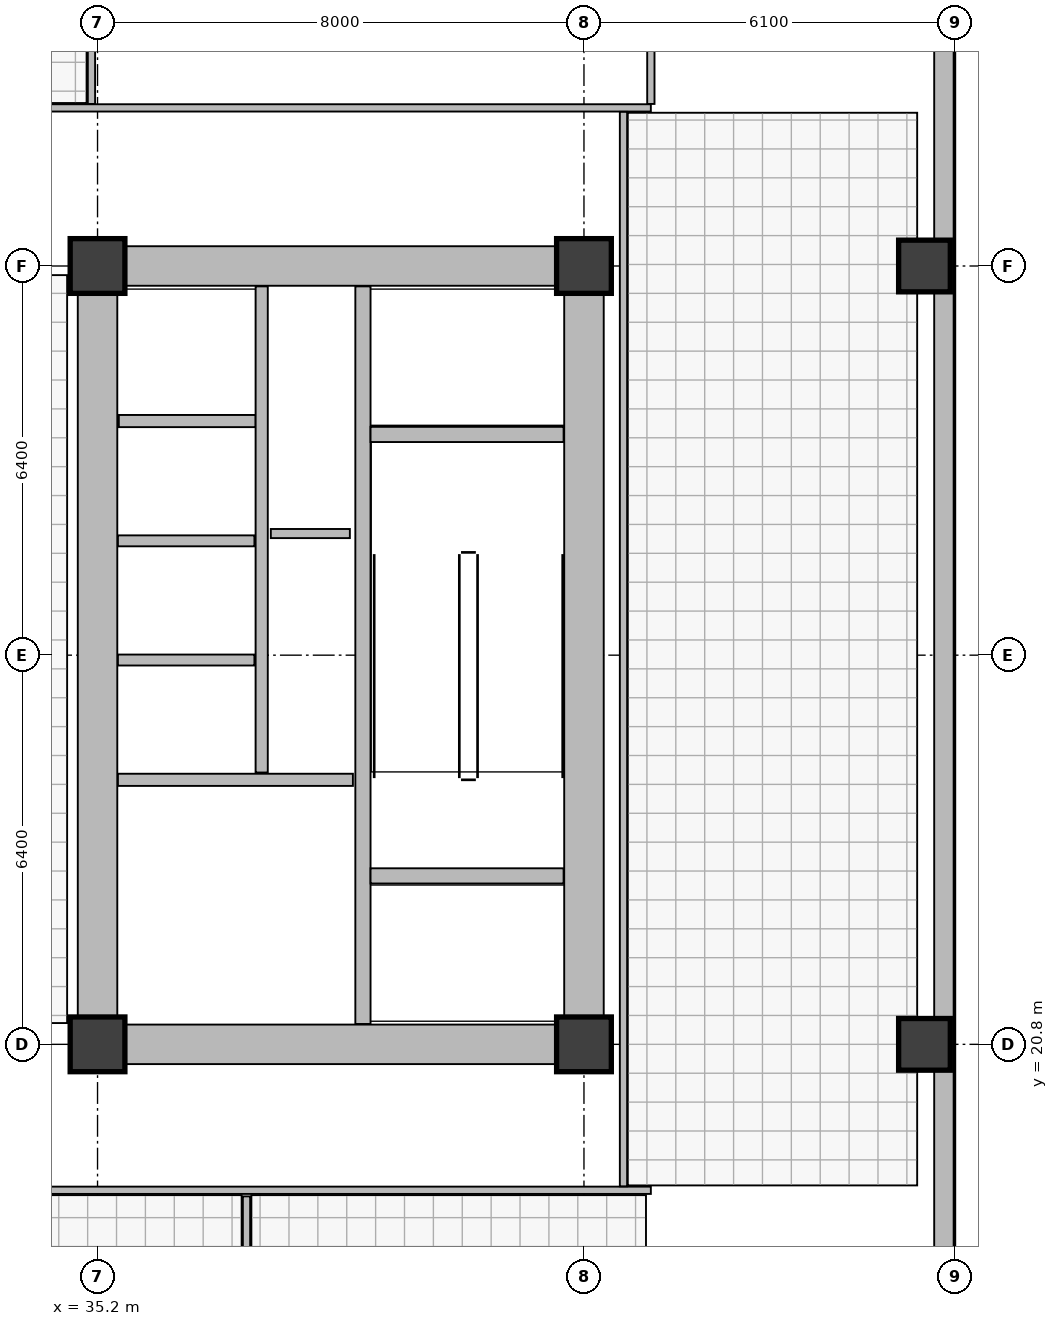
"""IFC4 building model, lengths in metres.
Left out: names, types, materials, properties, quantities, classifications, styles, units other than length and angle.
Written with IfcOpenShell. Run it as: python <this file> out.ifc"""

import sys

from ifc_helpers import new_model, si_unit, direction, frame, frame_2d, origin, origin_2d, place, context, subcontext, project, spatial, rectangle, extrude, element, fill, save


model = new_model("IFC4")
c1 = context("Model", 3, precision=1e-05, world=origin(), true_north=direction((0.0, 1.0)))
c2 = subcontext(c1, "Body", "Model", "MODEL_VIEW")
j1 = project(units=[si_unit("LENGTHUNIT", "METRE"), si_unit("PLANEANGLEUNIT", "RADIAN")], contexts=[c1])
p1 = place(None, origin())
s1 = spatial("IfcSite", under=j1, at=p1, CompositionType="ELEMENT")
p2 = place(p1, origin())
s2 = spatial("IfcBuilding", under=s1, at=p2, CompositionType="ELEMENT")
p3 = place(p2, frame((0.0, 0.0, 202.7)))
s3 = spatial("IfcBuildingStorey", under=s2, at=p3, CompositionType="ELEMENT", Elevation=202.7)
for number, where, z_axis, x_axis in (
    (1, (35.2, 20.8, 0.0), (0.0, 0.0, 1.0), (1.0, 0.0, 0.0)),
    (2, (43.2, 20.8, 0.0), (0.0, 0.0, 1.0), (1.0, 0.0, 0.0)),
    (3, (35.2, 33.6, 0.0), (0.0, 0.0, 1.0), (1.0, 0.0, 0.0)),
    (4, (43.2, 33.6, 0.0), (0.0, 0.0, 1.0), (1.0, 0.0, 0.0)),
):
    element("IfcColumn", number, at=place(p3, frame(where, z_axis=z_axis, x_axis=x_axis)), inside=s3, PredefinedType="COLUMN", context=c2, shape_type="SweptSolid", body=[
        extrude(rectangle(XDim=0.9, YDim=0.9, at=origin_2d()), origin(), (0.0, 0.0, 1.0), 4.8),
    ])
for number, where, z_axis, x_axis in (
    (5, (48.8, 20.8, 0.0), (0.0, 0.0, 1.0), (1.0, 0.0, 0.0)),
    (6, (48.8, 33.6, 0.0), (0.0, 0.0, 1.0), (1.0, 0.0, 0.0)),
):
    element("IfcColumn", number, at=place(p3, frame(where, z_axis=z_axis, x_axis=x_axis)), inside=s3, PredefinedType="COLUMN", context=c2, shape_type="SweptSolid", body=[
        extrude(rectangle(XDim=0.85, YDim=0.85, at=origin_2d()), origin(), (0.0, 0.0, 1.0), 4.8),
    ])
p4 = place(p3, frame((49.12, 47.9, 0.0), z_axis=(0.0, 0.0, 1.0), x_axis=(0.0, -1.0, 0.0)))
e7 = element("IfcWall", 7, at=p4, inside=s3, PredefinedType="STANDARD", context=c2, shape_type="SweptSolid", body=[
    extrude(rectangle(XDim=35.0, YDim=0.32, at=frame_2d((17.5, 0.0))), origin(), (0.0, 0.0, 1.0), 3.735),
])
p5 = place(p3, frame((43.2, 21.255, 0.0), z_axis=(0.0, 0.0, 1.0), x_axis=(0.0, 1.0, 0.0)))
e8 = element("IfcWall", 8, at=p5, inside=s3, PredefinedType="SHEAR", context=c2, shape_type="SweptSolid", body=[
    extrude(rectangle(XDim=11.89, YDim=0.65, at=frame_2d((5.945, 0.0))), origin(), (0.0, 0.0, 1.0), 4.35),
])
p6 = place(p3, frame((35.655, 20.8, 0.0), z_axis=(0.0, 0.0, 1.0), x_axis=(1.0, 0.0, 0.0)))
e9 = element("IfcWall", 9, at=p6, inside=s3, PredefinedType="SHEAR", context=c2, shape_type="SweptSolid", body=[
    extrude(rectangle(XDim=7.09, YDim=0.65, at=frame_2d((3.545, 0.0))), origin(), (0.0, 0.0, 1.0), 4.35),
])
p7 = place(p3, frame((35.655, 33.6, 0.0), z_axis=(0.0, 0.0, 1.0), x_axis=(1.0, 0.0, 0.0)))
e10 = element("IfcWall", 10, at=p7, inside=s3, PredefinedType="SHEAR", context=c2, shape_type="SweptSolid", body=[
    extrude(rectangle(XDim=7.09, YDim=0.65, at=frame_2d((3.545, 0.0))), origin(), (0.0, 0.0, 1.0), 4.35),
])
p8 = place(p7, frame((4.745, 0.0, 0.0)))
e11 = element("IfcOpeningElement", 11, at=p8, cuts=e10, PredefinedType="OPENING", context=c2, shape_type="SweptSolid", body=[
    extrude(rectangle(XDim=1.3, YDim=2.15, at=frame_2d((0.65, 1.075))), frame((0.0, 0.335, 0.0), z_axis=(0.0, -1.0, 0.0), x_axis=(1.0, 0.0, 0.0)), (0.0, 0.0, 1.0), 0.67),
])
p9 = place(p7, frame((2.545, 0.0, 0.0)))
e12 = element("IfcOpeningElement", 12, at=p9, cuts=e10, PredefinedType="OPENING", context=c2, shape_type="SweptSolid", body=[
    extrude(rectangle(XDim=0.85, YDim=2.02, at=frame_2d((0.425, 1.01))), frame((0.0, 0.335, 0.0), z_axis=(0.0, -1.0, 0.0), x_axis=(1.0, 0.0, 0.0)), (0.0, 0.0, 1.0), 0.67),
])
p10 = place(p3, frame((35.2, 21.255, 0.0), z_axis=(0.0, 0.0, 1.0), x_axis=(0.0, 1.0, 0.0)))
e13 = element("IfcWall", 13, at=p10, inside=s3, PredefinedType="SHEAR", context=c2, shape_type="SweptSolid", body=[
    extrude(rectangle(XDim=11.89, YDim=0.65, at=frame_2d((5.945, 0.0))), origin(), (0.0, 0.0, 1.0), 4.35),
])
p11 = place(p10, frame((1.345, 0.0, 0.0)))
e14 = element("IfcOpeningElement", 14, at=p11, cuts=e13, PredefinedType="OPENING", context=c2, shape_type="SweptSolid", body=[
    extrude(rectangle(XDim=1.2, YDim=2.15, at=frame_2d((0.6, 1.075))), frame((0.0, 0.335, 0.0), z_axis=(0.0, -1.0, 0.0), x_axis=(1.0, 0.0, 0.0)), (0.0, 0.0, 1.0), 0.67),
])
p12 = place(p10, frame((4.345, 0.0, 0.0)))
e15 = element("IfcOpeningElement", 15, at=p12, cuts=e13, PredefinedType="OPENING", context=c2, shape_type="SweptSolid", body=[
    extrude(rectangle(XDim=1.1, YDim=2.1, at=frame_2d((0.55, 1.05))), frame((0.0, 0.335, 0.0), z_axis=(0.0, -1.0, 0.0), x_axis=(1.0, 0.0, 0.0)), (0.0, 0.0, 1.0), 0.67),
])
p13 = place(p10, frame((6.295, 0.0, 0.0)))
e16 = element("IfcOpeningElement", 16, at=p13, cuts=e13, PredefinedType="OPENING", context=c2, shape_type="SweptSolid", body=[
    extrude(rectangle(XDim=1.1, YDim=2.1, at=frame_2d((0.55, 1.05))), frame((0.0, 0.335, 0.0), z_axis=(0.0, -1.0, 0.0), x_axis=(1.0, 0.0, 0.0)), (0.0, 0.0, 1.0), 0.67),
])
p14 = place(p10, frame((8.245, 0.0, 0.0)))
e17 = element("IfcOpeningElement", 17, at=p14, cuts=e13, PredefinedType="OPENING", context=c2, shape_type="SweptSolid", body=[
    extrude(rectangle(XDim=1.1, YDim=2.1, at=frame_2d((0.55, 1.05))), frame((0.0, 0.335, 0.0), z_axis=(0.0, -1.0, 0.0), x_axis=(1.0, 0.0, 0.0)), (0.0, 0.0, 1.0), 0.67),
])
p15 = place(p10, frame((10.445, 0.0, 0.0)))
e18 = element("IfcOpeningElement", 18, at=p15, cuts=e13, PredefinedType="OPENING", context=c2, shape_type="SweptSolid", body=[
    extrude(rectangle(XDim=1.1, YDim=2.1, at=frame_2d((0.55, 1.05))), frame((0.0, 0.335, 0.0), z_axis=(0.0, -1.0, 0.0), x_axis=(1.0, 0.0, 0.0)), (0.0, 0.0, 1.0), 0.67),
])
p16 = place(p3, frame((39.565, 21.135, 0.0), z_axis=(0.0, 0.0, 1.0), x_axis=(0.0, 1.0, 0.0)))
e19 = element("IfcWall", 19, at=p16, inside=s3, PredefinedType="SHEAR", context=c2, shape_type="SweptSolid", body=[
    extrude(rectangle(XDim=12.13, YDim=0.25, at=frame_2d((6.065, 0.0))), origin(), (0.0, 0.0, 1.0), 4.35),
])
p17 = place(p16, frame((0.515, 0.0, 0.0)))
e20 = element("IfcOpeningElement", 20, at=p17, cuts=e19, PredefinedType="OPENING", context=c2, shape_type="SweptSolid", body=[
    extrude(rectangle(XDim=1.2, YDim=2.15, at=frame_2d((0.6, 1.075))), frame((0.0, 0.135, 0.0), z_axis=(0.0, -1.0, 0.0), x_axis=(1.0, 0.0, 0.0)), (0.0, 0.0, 1.0), 0.27),
])
p18 = place(p16, frame((2.665, 0.0, 0.0)))
e21 = element("IfcOpeningElement", 21, at=p18, cuts=e19, PredefinedType="OPENING", context=c2, shape_type="SweptSolid", body=[
    extrude(rectangle(XDim=1.15, YDim=2.15, at=frame_2d((0.575, 1.075))), frame((0.0, 0.135, 0.0), z_axis=(0.0, -1.0, 0.0), x_axis=(1.0, 0.0, 0.0)), (0.0, 0.0, 1.0), 0.27),
])
for number, where, z_axis, x_axis in (
    (22, (39.69, 23.57, 0.0), (0.0, 0.0, 1.0), (1.0, 0.0, 0.0)),
    (23, (39.69, 30.83, 0.0), (0.0, 0.0, 1.0), (1.0, 0.0, 0.0)),
):
    element("IfcWall", number, at=place(p3, frame(where, z_axis=z_axis, x_axis=x_axis)), inside=s3, PredefinedType="SHEAR", context=c2, shape_type="SweptSolid", body=[
        extrude(rectangle(XDim=3.175, YDim=0.25, at=frame_2d((1.587, 0.0))), origin(), (0.0, 0.0, 1.0), 4.35),
    ])
p19 = place(p3, frame((35.535, 25.15, 0.0), z_axis=(0.0, 0.0, 1.0), x_axis=(1.0, 0.0, 0.0)))
e24 = element("IfcWall", 24, at=p19, inside=s3, PredefinedType="SOLIDWALL", context=c2, shape_type="SweptSolid", body=[
    extrude(rectangle(XDim=3.865, YDim=0.2, at=frame_2d((1.933, 0.0))), origin(), (0.0, 0.0, 1.0), 4.35),
])
p20 = place(p3, frame((35.55, 31.05, 0.0), z_axis=(0.0, 0.0, 1.0), x_axis=(1.0, 0.0, 0.0)))
e25 = element("IfcWall", 25, at=p20, inside=s3, PredefinedType="SOLIDWALL", context=c2, shape_type="SweptSolid", body=[
    extrude(rectangle(XDim=2.25, YDim=0.2, at=frame_2d((1.125, 0.0))), origin(), (0.0, 0.0, 1.0), 4.35),
])
p21 = place(p3, frame((37.9, 25.27, 0.0), z_axis=(0.0, 0.0, 1.0), x_axis=(0.0, 1.0, 0.0)))
e26 = element("IfcWall", 26, at=p21, inside=s3, PredefinedType="SOLIDWALL", context=c2, shape_type="SweptSolid", body=[
    extrude(rectangle(XDim=7.995, YDim=0.2, at=frame_2d((3.998, 0.0))), origin(), (0.0, 0.0, 1.0), 4.35),
])
for number, where, z_axis, x_axis in (
    (27, (35.535, 27.12, 0.0), (0.0, 0.0, 1.0), (1.0, 0.0, 0.0)),
    (28, (35.535, 29.08, 0.0), (0.0, 0.0, 1.0), (1.0, 0.0, 0.0)),
):
    element("IfcWall", number, at=place(p3, frame(where, z_axis=z_axis, x_axis=x_axis)), inside=s3, PredefinedType="PARTITIONING", context=c2, shape_type="SweptSolid", body=[
        extrude(rectangle(XDim=2.245, YDim=0.18, at=frame_2d((1.123, 0.0))), origin(), (0.0, 0.0, 1.0), 4.35),
    ])
p22 = place(p3, frame((38.05, 29.2, 0.0), z_axis=(0.0, 0.0, 1.0), x_axis=(1.0, 0.0, 0.0)))
e29 = element("IfcWall", 29, at=p22, inside=s3, PredefinedType="PARTITIONING", context=c2, shape_type="SweptSolid", body=[
    extrude(rectangle(XDim=1.3, YDim=0.15, at=frame_2d((0.65, 0.0))), origin(), (0.0, 0.0, 1.0), 4.35),
])
p23 = place(p22, frame((0.22, 0.0, 0.0)))
e30 = element("IfcOpeningElement", 30, at=p23, cuts=e29, PredefinedType="OPENING", context=c2, shape_type="SweptSolid", body=[
    extrude(rectangle(XDim=0.85, YDim=2.02, at=frame_2d((0.425, 1.01))), frame((0.0, 0.085, 0.0), z_axis=(0.0, -1.0, 0.0), x_axis=(1.0, 0.0, 0.0)), (0.0, 0.0, 1.0), 0.17),
])
p24 = place(p3, frame((9.3, 18.4, 0.0), z_axis=(0.0, 0.0, 1.0), x_axis=(1.0, 0.0, 0.0)))
e31 = element("IfcWall", 31, at=p24, inside=s3, PredefinedType="PARTITIONING", context=c2, shape_type="SweptSolid", body=[
    extrude(rectangle(XDim=35.0, YDim=0.12, at=frame_2d((17.5, 0.0))), origin(), (0.0, 0.0, 1.0), 4.35),
])
p25 = place(p24, frame((2.2, 0.0, 0.0)))
e32 = element("IfcOpeningElement", 32, at=p25, cuts=e31, PredefinedType="OPENING", context=c2, shape_type="SweptSolid", body=[
    extrude(rectangle(XDim=1.0, YDim=2.1, at=frame_2d((0.5, 1.05))), frame((0.0, 0.07, 0.0), z_axis=(0.0, -1.0, 0.0), x_axis=(1.0, 0.0, 0.0)), (0.0, 0.0, 1.0), 0.14),
])
p26 = place(p24, frame((9.2, 0.0, 0.0)))
e33 = element("IfcOpeningElement", 33, at=p26, cuts=e31, PredefinedType="OPENING", context=c2, shape_type="SweptSolid", body=[
    extrude(rectangle(XDim=1.0, YDim=2.1, at=frame_2d((0.5, 1.05))), frame((0.0, 0.07, 0.0), z_axis=(0.0, -1.0, 0.0), x_axis=(1.0, 0.0, 0.0)), (0.0, 0.0, 1.0), 0.14),
])
p27 = place(p24, frame((16.55, 0.0, 0.0)))
e34 = element("IfcOpeningElement", 34, at=p27, cuts=e31, PredefinedType="OPENING", context=c2, shape_type="SweptSolid", body=[
    extrude(rectangle(XDim=1.0, YDim=2.1, at=frame_2d((0.5, 1.05))), frame((0.0, 0.07, 0.0), z_axis=(0.0, -1.0, 0.0), x_axis=(1.0, 0.0, 0.0)), (0.0, 0.0, 1.0), 0.14),
])
p28 = place(p24, frame((23.9, 0.0, 0.0)))
e35 = element("IfcOpeningElement", 35, at=p28, cuts=e31, PredefinedType="OPENING", context=c2, shape_type="SweptSolid", body=[
    extrude(rectangle(XDim=1.0, YDim=2.1, at=frame_2d((0.5, 1.05))), frame((0.0, 0.07, 0.0), z_axis=(0.0, -1.0, 0.0), x_axis=(1.0, 0.0, 0.0)), (0.0, 0.0, 1.0), 0.14),
])
p29 = place(p24, frame((30.55, 0.0, 0.0)))
e36 = element("IfcOpeningElement", 36, at=p29, cuts=e31, PredefinedType="OPENING", context=c2, shape_type="SweptSolid", body=[
    extrude(rectangle(XDim=1.0, YDim=2.1, at=frame_2d((0.5, 1.05))), frame((0.0, 0.07, 0.0), z_axis=(0.0, -1.0, 0.0), x_axis=(1.0, 0.0, 0.0)), (0.0, 0.0, 1.0), 0.14),
])
p30 = place(p3, frame((9.3, 36.2, 0.0), z_axis=(0.0, 0.0, 1.0), x_axis=(1.0, 0.0, 0.0)))
e37 = element("IfcWall", 37, at=p30, inside=s3, PredefinedType="PARTITIONING", context=c2, shape_type="SweptSolid", body=[
    extrude(rectangle(XDim=35.0, YDim=0.12, at=frame_2d((17.5, 0.0))), origin(), (0.0, 0.0, 1.0), 4.35),
])
p31 = place(p30, frame((1.3, 0.0, 0.0)))
e38 = element("IfcOpeningElement", 38, at=p31, cuts=e37, PredefinedType="OPENING", context=c2, shape_type="SweptSolid", body=[
    extrude(rectangle(XDim=0.95, YDim=2.1, at=frame_2d((0.475, 1.05))), frame((0.0, 0.07, 0.0), z_axis=(0.0, -1.0, 0.0), x_axis=(1.0, 0.0, 0.0)), (0.0, 0.0, 1.0), 0.14),
])
p32 = place(p30, frame((4.9, 0.0, 0.0)))
e39 = element("IfcOpeningElement", 39, at=p32, cuts=e37, PredefinedType="OPENING", context=c2, shape_type="SweptSolid", body=[
    extrude(rectangle(XDim=0.95, YDim=2.1, at=frame_2d((0.475, 1.05))), frame((0.0, 0.07, 0.0), z_axis=(0.0, -1.0, 0.0), x_axis=(1.0, 0.0, 0.0)), (0.0, 0.0, 1.0), 0.14),
])
p33 = place(p30, frame((8.3, 0.0, 0.0)))
e40 = element("IfcOpeningElement", 40, at=p33, cuts=e37, PredefinedType="OPENING", context=c2, shape_type="SweptSolid", body=[
    extrude(rectangle(XDim=1.0, YDim=2.1, at=frame_2d((0.5, 1.05))), frame((0.0, 0.07, 0.0), z_axis=(0.0, -1.0, 0.0), x_axis=(1.0, 0.0, 0.0)), (0.0, 0.0, 1.0), 0.14),
])
p34 = place(p30, frame((13.5, 0.0, 0.0)))
e41 = element("IfcOpeningElement", 41, at=p34, cuts=e37, PredefinedType="OPENING", context=c2, shape_type="SweptSolid", body=[
    extrude(rectangle(XDim=1.5, YDim=2.15, at=frame_2d((0.75, 1.075))), frame((0.0, 0.07, 0.0), z_axis=(0.0, -1.0, 0.0), x_axis=(1.0, 0.0, 0.0)), (0.0, 0.0, 1.0), 0.14),
])
p35 = place(p30, frame((28.0, 0.0, 0.0)))
e42 = element("IfcOpeningElement", 42, at=p35, cuts=e37, PredefinedType="OPENING", context=c2, shape_type="SweptSolid", body=[
    extrude(rectangle(XDim=1.0, YDim=2.1, at=frame_2d((0.5, 1.05))), frame((0.0, 0.07, 0.0), z_axis=(0.0, -1.0, 0.0), x_axis=(1.0, 0.0, 0.0)), (0.0, 0.0, 1.0), 0.14),
])
p36 = place(p3, frame((37.65, 8.245, 0.0), z_axis=(0.0, 0.0, 1.0), x_axis=(0.0, 1.0, 0.0)))
e43 = element("IfcWall", 43, at=p36, inside=s3, PredefinedType="PARTITIONING", context=c2, shape_type="SweptSolid", body=[
    extrude(rectangle(XDim=10.055, YDim=0.12, at=frame_2d((5.027, 0.0))), origin(), (0.0, 0.0, 1.0), 4.35),
])
p37 = place(p3, frame((44.3, 36.265, 0.0), z_axis=(0.0, 0.0, 1.0), x_axis=(0.0, 1.0, 0.0)))
e44 = element("IfcWall", 44, at=p37, inside=s3, PredefinedType="PARTITIONING", context=c2, shape_type="SweptSolid", body=[
    extrude(rectangle(XDim=16.29, YDim=0.12, at=frame_2d((8.145, 0.0))), origin(), (0.0, 0.0, 1.0), 4.35),
])
p38 = place(p3, frame((35.1, 36.265, 0.0), z_axis=(0.0, 0.0, 1.0), x_axis=(0.0, 1.0, 0.0)))
e45 = element("IfcWall", 45, at=p38, inside=s3, PredefinedType="PARTITIONING", context=c2, shape_type="SweptSolid", body=[
    extrude(rectangle(XDim=16.29, YDim=0.12, at=frame_2d((8.145, 0.0))), origin(), (0.0, 0.0, 1.0), 3.535),
])
p39 = place(p3, frame((43.85, 18.465, 0.0), z_axis=(0.0, 0.0, 1.0), x_axis=(0.0, 1.0, 0.0)))
e46 = element("IfcWall", 46, at=p39, inside=s3, PredefinedType="PARTITIONING", context=c2, shape_type="SweptSolid", body=[
    extrude(rectangle(XDim=17.67, YDim=0.12, at=frame_2d((8.835, 0.0))), origin(), (0.0, 0.0, 1.0), 4.35),
])
p40 = place(p39, frame((0.385, 0.0, 0.0)))
e47 = element("IfcOpeningElement", 47, at=p40, cuts=e46, PredefinedType="OPENING", context=c2, shape_type="SweptSolid", body=[
    extrude(rectangle(XDim=1.1, YDim=2.15, at=frame_2d((0.55, 1.075))), frame((0.0, 0.07, 0.0), z_axis=(0.0, -1.0, 0.0), x_axis=(1.0, 0.0, 0.0)), (0.0, 0.0, 1.0), 0.14),
])
p41 = place(p8, origin())
e48 = element("IfcDoor", 48, at=p41, inside=s3, OperationType="DOUBLE_DOOR_SLIDING", PredefinedType="DOOR", context=c2, shape_type="SweptSolid", body=[
    extrude(rectangle(XDim=1.3, YDim=2.15, at=frame_2d((0.65, 1.075))), frame((0.0, 0.025, 0.0), z_axis=(0.0, -1.0, 0.0), x_axis=(1.0, 0.0, 0.0)), (0.0, 0.0, 1.0), 0.05),
])
fill(e11, e48)
p42 = place(p9, origin())
e49 = element("IfcDoor", 49, at=p42, inside=s3, OperationType="SINGLE_SWING_LEFT", PredefinedType="DOOR", context=c2, shape_type="SweptSolid", body=[
    extrude(rectangle(XDim=0.85, YDim=2.02, at=frame_2d((0.425, 1.01))), frame((0.0, 0.025, 0.0), z_axis=(0.0, -1.0, 0.0), x_axis=(1.0, 0.0, 0.0)), (0.0, 0.0, 1.0), 0.05),
])
fill(e12, e49)
p43 = place(p11, origin())
e50 = element("IfcDoor", 50, at=p43, inside=s3, OperationType="SINGLE_SWING_RIGHT", PredefinedType="DOOR", context=c2, shape_type="SweptSolid", body=[
    extrude(rectangle(XDim=1.2, YDim=2.15, at=frame_2d((0.6, 1.075))), frame((0.0, 0.025, 0.0), z_axis=(0.0, -1.0, 0.0), x_axis=(1.0, 0.0, 0.0)), (0.0, 0.0, 1.0), 0.05),
])
fill(e14, e50)
p44 = place(p12, origin())
e51 = element("IfcDoor", 51, at=p44, inside=s3, OperationType="DOUBLE_DOOR_SLIDING", PredefinedType="DOOR", context=c2, shape_type="SweptSolid", body=[
    extrude(rectangle(XDim=1.1, YDim=2.1, at=frame_2d((0.55, 1.05))), frame((0.0, 0.025, 0.0), z_axis=(0.0, -1.0, 0.0), x_axis=(1.0, 0.0, 0.0)), (0.0, 0.0, 1.0), 0.05),
])
fill(e15, e51)
p45 = place(p13, origin())
e52 = element("IfcDoor", 52, at=p45, inside=s3, OperationType="DOUBLE_DOOR_SLIDING", PredefinedType="DOOR", context=c2, shape_type="SweptSolid", body=[
    extrude(rectangle(XDim=1.1, YDim=2.1, at=frame_2d((0.55, 1.05))), frame((0.0, 0.025, 0.0), z_axis=(0.0, -1.0, 0.0), x_axis=(1.0, 0.0, 0.0)), (0.0, 0.0, 1.0), 0.05),
])
fill(e16, e52)
p46 = place(p14, origin())
e53 = element("IfcDoor", 53, at=p46, inside=s3, OperationType="DOUBLE_DOOR_SLIDING", PredefinedType="DOOR", context=c2, shape_type="SweptSolid", body=[
    extrude(rectangle(XDim=1.1, YDim=2.1, at=frame_2d((0.55, 1.05))), frame((0.0, 0.025, 0.0), z_axis=(0.0, -1.0, 0.0), x_axis=(1.0, 0.0, 0.0)), (0.0, 0.0, 1.0), 0.05),
])
fill(e17, e53)
p47 = place(p15, origin())
e54 = element("IfcDoor", 54, at=p47, inside=s3, OperationType="DOUBLE_DOOR_SLIDING", PredefinedType="DOOR", context=c2, shape_type="SweptSolid", body=[
    extrude(rectangle(XDim=1.1, YDim=2.1, at=frame_2d((0.55, 1.05))), frame((0.0, 0.025, 0.0), z_axis=(0.0, -1.0, 0.0), x_axis=(1.0, 0.0, 0.0)), (0.0, 0.0, 1.0), 0.05),
])
fill(e18, e54)
p48 = place(p17, origin())
e55 = element("IfcDoor", 55, at=p48, inside=s3, OperationType="DOUBLE_DOOR_SLIDING", PredefinedType="DOOR", context=c2, shape_type="SweptSolid", body=[
    extrude(rectangle(XDim=1.2, YDim=2.15, at=frame_2d((0.6, 1.075))), frame((0.0, 0.025, 0.0), z_axis=(0.0, -1.0, 0.0), x_axis=(1.0, 0.0, 0.0)), (0.0, 0.0, 1.0), 0.05),
])
fill(e20, e55)
p49 = place(p18, origin())
e56 = element("IfcDoor", 56, at=p49, inside=s3, OperationType="SINGLE_SWING_LEFT", PredefinedType="DOOR", context=c2, shape_type="SweptSolid", body=[
    extrude(rectangle(XDim=1.15, YDim=2.15, at=frame_2d((0.575, 1.075))), frame((0.0, 0.025, 0.0), z_axis=(0.0, -1.0, 0.0), x_axis=(1.0, 0.0, 0.0)), (0.0, 0.0, 1.0), 0.05),
])
fill(e21, e56)
p50 = place(p23, origin())
e57 = element("IfcDoor", 57, at=p50, inside=s3, OperationType="SINGLE_SWING_LEFT", PredefinedType="DOOR", context=c2, shape_type="SweptSolid", body=[
    extrude(rectangle(XDim=0.85, YDim=2.02, at=frame_2d((0.425, 1.01))), frame((0.0, 0.025, 0.0), z_axis=(0.0, -1.0, 0.0), x_axis=(1.0, 0.0, 0.0)), (0.0, 0.0, 1.0), 0.05),
])
fill(e30, e57)
p51 = place(p29, origin())
e58 = element("IfcDoor", 58, at=p51, inside=s3, OperationType="SINGLE_SWING_RIGHT", PredefinedType="DOOR", context=c2, shape_type="SweptSolid", body=[
    extrude(rectangle(XDim=1.0, YDim=2.1, at=frame_2d((0.5, 1.05))), frame((0.0, 0.025, 0.0), z_axis=(0.0, -1.0, 0.0), x_axis=(1.0, 0.0, 0.0)), (0.0, 0.0, 1.0), 0.05),
])
fill(e36, e58)
p52 = place(p35, origin())
e59 = element("IfcDoor", 59, at=p52, inside=s3, OperationType="SINGLE_SWING_LEFT", PredefinedType="DOOR", context=c2, shape_type="SweptSolid", body=[
    extrude(rectangle(XDim=1.0, YDim=2.1, at=frame_2d((0.5, 1.05))), frame((0.0, 0.025, 0.0), z_axis=(0.0, -1.0, 0.0), x_axis=(1.0, 0.0, 0.0)), (0.0, 0.0, 1.0), 0.05),
])
fill(e42, e59)
p53 = place(p40, origin())
e60 = element("IfcDoor", 60, at=p53, inside=s3, OperationType="SINGLE_SWING_LEFT", PredefinedType="DOOR", context=c2, shape_type="SweptSolid", body=[
    extrude(rectangle(XDim=1.1, YDim=2.15, at=frame_2d((0.55, 1.075))), frame((0.0, 0.025, 0.0), z_axis=(0.0, -1.0, 0.0), x_axis=(1.0, 0.0, 0.0)), (0.0, 0.0, 1.0), 0.05),
])
fill(e47, e60)
save(model, sys.argv[1])
